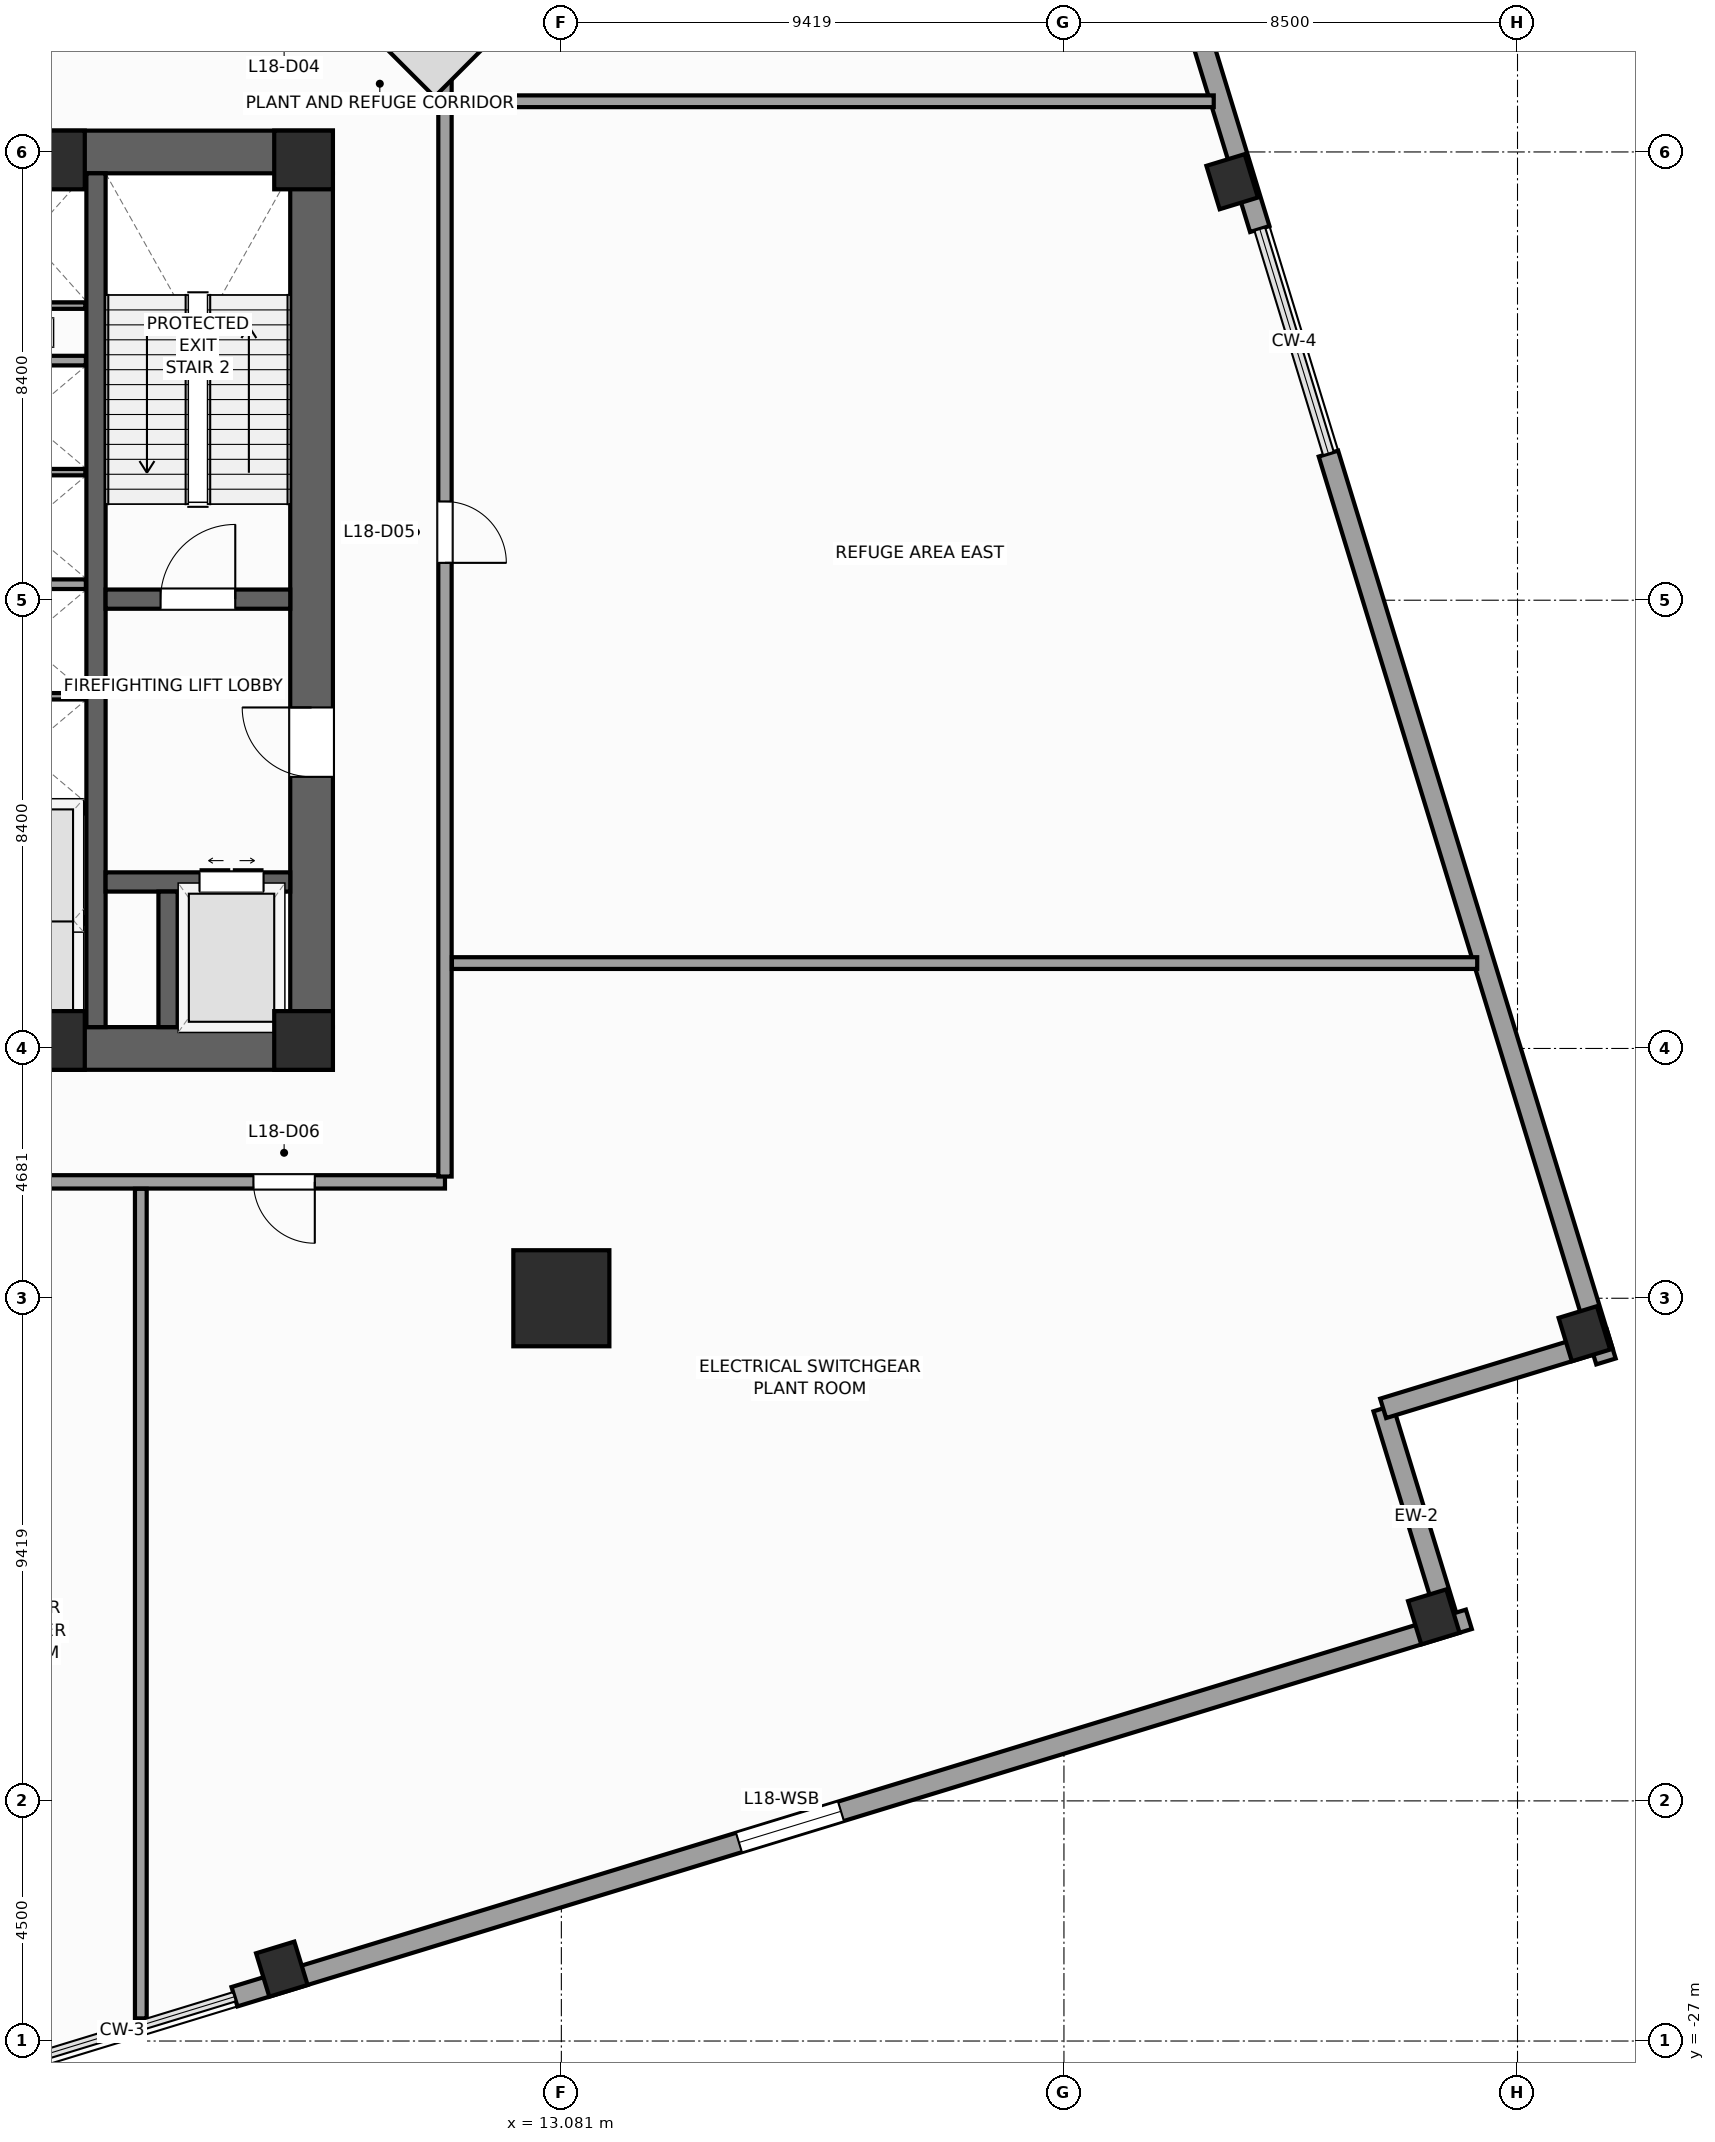
"""IFC4 building model, lengths in metres.
Left out: names, types, materials, properties, quantities, classifications, styles, units other than length and angle.
Written with IfcOpenShell. Run it as: python <this file> out.ifc"""

import sys

from ifc_helpers import new_model, si_unit, direction, frame, frame_2d, origin, origin_2d, place, context, subcontext, project, spatial, rectangle, extrude, source, transform, mapped, element, fill, save


model = new_model("IFC4")
c1 = context("Model", 3, precision=1e-05, world=origin(), true_north=direction((0.0, 1.0)))
c2 = subcontext(c1, "Body", "Model", "MODEL_VIEW")
j1 = project(units=[si_unit("LENGTHUNIT", "METRE"), si_unit("PLANEANGLEUNIT", "RADIAN")], contexts=[c1])
p1 = place(None, origin())
s1 = spatial("IfcSite", under=j1, at=p1, CompositionType="ELEMENT")
p2 = place(p1, origin())
s2 = spatial("IfcBuilding", under=s1, at=p2, CompositionType="ELEMENT")
p3 = place(p2, frame((0.0, 0.0, 78.0)))
s3 = spatial("IfcBuildingStorey", under=s2, at=p3, CompositionType="ELEMENT", Elevation=78.0)
p4 = place(p3, frame((-8.8, -8.4, 0.0), z_axis=(0.0, 0.0, 1.0), x_axis=(1.0, 0.0, 0.0)))
e1 = element("IfcWall", 1, at=p4, inside=s3, PredefinedType="SHEAR", context=c2, shape_type="SweptSolid", body=[
    extrude(rectangle(XDim=17.6, YDim=0.8, at=frame_2d((8.8, 0.0))), origin(), (0.0, 0.0, 1.0), 5.2),
])
p5 = place(p4, frame((8.15, 0.0, 0.0)))
e2 = element("IfcOpeningElement", 2, at=p5, cuts=e1, PredefinedType="OPENING", context=c2, shape_type="SweptSolid", body=[
    extrude(rectangle(XDim=1.3, YDim=2.2, at=frame_2d((0.65, 1.1))), frame((0.0, 0.41, 0.0), z_axis=(0.0, -1.0, 0.0), x_axis=(1.0, 0.0, 0.0)), (0.0, 0.0, 1.0), 0.82),
])
p6 = place(p3, frame((-8.8, 8.4, 0.0), z_axis=(0.0, 0.0, 1.0), x_axis=(1.0, 0.0, 0.0)))
e3 = element("IfcWall", 3, at=p6, inside=s3, PredefinedType="SHEAR", context=c2, shape_type="SweptSolid", body=[
    extrude(rectangle(XDim=17.6, YDim=0.8, at=frame_2d((8.8, 0.0))), origin(), (0.0, 0.0, 1.0), 5.2),
])
p7 = place(p3, frame((8.4, -8.0, 0.0), z_axis=(0.0, 0.0, 1.0), x_axis=(0.0, 1.0, 0.0)))
e4 = element("IfcWall", 4, at=p7, inside=s3, PredefinedType="SHEAR", context=c2, shape_type="SweptSolid", body=[
    extrude(rectangle(XDim=16.0, YDim=0.8, at=frame_2d((8.0, 0.0))), origin(), (0.0, 0.0, 1.0), 5.2),
])
p8 = place(p7, frame((4.69, 0.0, 0.0)))
e5 = element("IfcOpeningElement", 5, at=p8, cuts=e4, PredefinedType="OPENING", context=c2, shape_type="SweptSolid", body=[
    extrude(rectangle(XDim=1.3, YDim=2.2, at=frame_2d((0.65, 1.1))), frame((0.0, 0.41, 0.0), z_axis=(0.0, -1.0, 0.0), x_axis=(1.0, 0.0, 0.0)), (0.0, 0.0, 1.0), 0.82),
])
p9 = place(p3, frame((4.36, -8.0, 0.0), z_axis=(0.0, 0.0, 1.0), x_axis=(0.0, 1.0, 0.0)))
e6 = element("IfcWall", 6, at=p9, inside=s3, PredefinedType="SHEAR", context=c2, shape_type="SweptSolid", body=[
    extrude(rectangle(XDim=16.0, YDim=0.36, at=frame_2d((8.0, 0.0))), origin(), (0.0, 0.0, 1.0), 5.2),
])
p10 = place(p3, frame((4.54, 0.02, 0.0), z_axis=(0.0, 0.0, 1.0), x_axis=(1.0, 0.0, 0.0)))
e7 = element("IfcWall", 7, at=p10, inside=s3, PredefinedType="SHEAR", context=c2, shape_type="SweptSolid", body=[
    extrude(rectangle(XDim=3.46, YDim=0.36, at=frame_2d((1.73, 0.0))), origin(), (0.0, 0.0, 1.0), 5.2),
])
p11 = place(p10, frame((1.03, 0.0, 0.0)))
e8 = element("IfcOpeningElement", 8, at=p11, cuts=e7, PredefinedType="OPENING", context=c2, shape_type="SweptSolid", body=[
    extrude(rectangle(XDim=1.4, YDim=2.2, at=frame_2d((0.7, 1.1))), frame((0.0, 0.19, 0.0), z_axis=(0.0, -1.0, 0.0), x_axis=(1.0, 0.0, 0.0)), (0.0, 0.0, 1.0), 0.38),
])
p12 = place(p3, frame((4.54, -5.28, 0.0), z_axis=(0.0, 0.0, 1.0), x_axis=(1.0, 0.0, 0.0)))
e9 = element("IfcWall", 9, at=p12, inside=s3, PredefinedType="SHEAR", context=c2, shape_type="SweptSolid", body=[
    extrude(rectangle(XDim=3.46, YDim=0.36, at=frame_2d((1.73, 0.0))), origin(), (0.0, 0.0, 1.0), 5.2),
])
p13 = place(p12, frame((1.76, 0.0, 0.0)))
e10 = element("IfcOpeningElement", 10, at=p13, cuts=e9, PredefinedType="OPENING", context=c2, shape_type="SweptSolid", body=[
    extrude(rectangle(XDim=1.2, YDim=2.25, at=frame_2d((0.6, 1.125))), frame((0.0, 0.19, 0.0), z_axis=(0.0, -1.0, 0.0), x_axis=(1.0, 0.0, 0.0)), (0.0, 0.0, 1.0), 0.38),
])
p14 = place(p3, frame((5.71, -8.0, 0.0), z_axis=(0.0, 0.0, 1.0), x_axis=(0.0, 1.0, 0.0)))
e11 = element("IfcWall", 11, at=p14, inside=s3, PredefinedType="SHEAR", context=c2, shape_type="SweptSolid", body=[
    extrude(rectangle(XDim=2.54, YDim=0.36, at=frame_2d((1.27, 0.0))), origin(), (0.0, 0.0, 1.0), 5.2),
])
m1 = source(origin(), c2, "Body", "SweptSolid", [
    extrude(rectangle(XDim=1.1, YDim=1.1, at=origin_2d()), origin(), (0.0, 0.0, 1.0), 5.2),
])
for number, where, z_axis, x_axis in (
    (12, (8.25, -8.25, 0.0), (0.0, 0.0, 1.0), (1.0, 0.0, 0.0)),
    (13, (8.25, 8.25, 0.0), (0.0, 0.0, 1.0), (1.0, 0.0, 0.0)),
    (14, (3.6, -8.25, 0.0), (0.0, 0.0, 1.0), (1.0, 0.0, 0.0)),
    (15, (3.6, 8.25, 0.0), (0.0, 0.0, 1.0), (1.0, 0.0, 0.0)),
):
    element("IfcColumn", number, at=place(p3, frame(where, z_axis=z_axis, x_axis=x_axis)), inside=s3, PredefinedType="PILASTER", context=c2, shape_type="MappedRepresentation", body=[
        mapped(m1, transform((0.0, 0.0, 0.0), scale=1.0)),
    ])
m2 = source(origin(), c2, "Body", "SweptSolid", [
    extrude(rectangle(XDim=1.8, YDim=1.8, at=origin_2d()), origin(), (0.0, 0.0, 1.0), 5.2),
])
p15 = place(p3, frame((13.081, -13.081, 0.0), z_axis=(0.0, 0.0, 1.0), x_axis=(1.0, 0.0, 0.0)))
e16 = element("IfcColumn", 16, at=p15, inside=s3, PredefinedType="COLUMN", context=c2, shape_type="MappedRepresentation", body=[
    mapped(m2, transform((0.0, 0.0, 0.0), scale=1.0)),
])
m3 = source(origin(), c2, "Body", "SweptSolid", [
    extrude(rectangle(XDim=0.75, YDim=0.85, at=origin_2d()), origin(), (0.0, 0.0, 1.0), 5.2),
])
for number, where, z_axis, x_axis in (
    (17, (7.843, -25.653, 0.0), (0.0, 0.0, 1.0), (0.956, 0.292, 0.0)),
    (18, (29.431, -19.052, 0.0), (0.0, 0.0, 1.0), (0.956, 0.292, 0.0)),
    (19, (32.253, -13.746, 0.0), (0.0, 0.0, 1.0), (0.956, 0.292, 0.0)),
    (20, (25.653, 7.843, 0.0), (0.0, 0.0, 1.0), (0.956, 0.292, 0.0)),
):
    element("IfcColumn", number, at=place(p3, frame(where, z_axis=z_axis, x_axis=x_axis)), inside=s3, PredefinedType="COLUMN", context=c2, shape_type="MappedRepresentation", body=[
        mapped(m3, transform((0.0, 0.0, 0.0), scale=1.0)),
    ])
p16 = place(p3, frame((29.725, -19.208, 0.0), z_axis=(0.0, 0.0, 1.0), x_axis=(-0.292345507338, 0.956312764915, 0.0)))
e21 = element("IfcWall", 21, at=p16, inside=s3, PredefinedType="STANDARD", context=c2, shape_type="SweptSolid", body=[
    extrude(rectangle(XDim=4.25, YDim=0.38, at=frame_2d((2.125, 0.0))), origin(), (0.0, 0.0, 1.0), 4.94),
])
p17 = place(p3, frame((28.482, -15.144, 0.0), z_axis=(0.0, 0.0, 1.0), x_axis=(0.956304176051, 0.292373601522, 0.0)))
e22 = element("IfcWall", 22, at=p17, inside=s3, PredefinedType="STANDARD", context=c2, shape_type="SweptSolid", body=[
    extrude(rectangle(XDim=4.44, YDim=0.38, at=frame_2d((2.22, 0.0))), origin(), (0.0, 0.0, 1.0), 4.24),
])
p18 = place(p3, frame((6.955, -26.17, 0.0), z_axis=(0.0, 0.0, 1.0), x_axis=(0.95630447169, 0.292372634538, 0.0)))
e23 = element("IfcWall", 23, at=p18, inside=s3, PredefinedType="STANDARD", context=c2, shape_type="SweptSolid", body=[
    extrude(rectangle(XDim=24.19, YDim=0.38, at=frame_2d((12.095, 0.0))), origin(), (0.0, 0.0, 1.0), 4.34),
])
p19 = place(p18, frame((9.885, 0.0, 0.65)))
e24 = element("IfcOpeningElement", 24, at=p19, cuts=e23, PredefinedType="OPENING", context=c2, shape_type="SweptSolid", body=[
    extrude(rectangle(XDim=2.0, YDim=1.45, at=frame_2d((1.0, 0.725))), frame((0.0, 0.2, 0.0), z_axis=(0.0, -1.0, 0.0), x_axis=(1.0, 0.0, 0.0)), (0.0, 0.0, 1.0), 0.4),
])
p20 = place(p3, frame((32.658, -14.265, 0.0), z_axis=(0.0, 0.0, 1.0), x_axis=(-0.292377517944, 0.956302978664, 0.0)))
e25 = element("IfcWall", 25, at=p20, inside=s3, PredefinedType="STANDARD", context=c2, shape_type="SweptSolid", body=[
    extrude(rectangle(XDim=17.79, YDim=0.38, at=frame_2d((8.895, 0.0))), origin(), (0.0, 0.0, 1.0), 4.34),
])
p21 = place(p3, frame((26.17, 6.955, 0.0), z_axis=(0.0, 0.0, 1.0), x_axis=(-0.292372634538, 0.95630447169, 0.0)))
e26 = element("IfcWall", 26, at=p21, inside=s3, PredefinedType="STANDARD", context=c2, shape_type="SweptSolid", body=[
    extrude(rectangle(XDim=24.19, YDim=0.38, at=frame_2d((12.095, 0.0))), origin(), (0.0, 0.0, 1.0), 4.34),
])
p22 = place(p21, frame((9.885, 0.0, 0.65)))
e27 = element("IfcOpeningElement", 27, at=p22, cuts=e26, PredefinedType="OPENING", context=c2, shape_type="SweptSolid", body=[
    extrude(rectangle(XDim=2.0, YDim=1.45, at=frame_2d((1.0, 0.725))), frame((0.0, 0.2, 0.0), z_axis=(0.0, -1.0, 0.0), x_axis=(1.0, 0.0, 0.0)), (0.0, 0.0, 1.0), 0.4),
])
for number, where, z_axis, x_axis in (
    (28, (1.89, -3.9, 0.0), (0.0, 0.0, 1.0), (1.0, 0.0, 0.0)),
    (29, (1.89, 0.3, 0.0), (0.0, 0.0, 1.0), (1.0, 0.0, 0.0)),
    (30, (1.89, 4.49, 0.0), (0.0, 0.0, 1.0), (1.0, 0.0, 0.0)),
):
    element("IfcWall", number, at=place(p3, frame(where, z_axis=z_axis, x_axis=x_axis)), inside=s3, PredefinedType="PARTITIONING", context=c2, shape_type="SweptSolid", body=[
        extrude(rectangle(XDim=2.28, YDim=0.18, at=frame_2d((1.14, 0.0))), origin(), (0.0, 0.0, 1.0), 4.94),
    ])
for number, where, z_axis, x_axis in (
    (31, (1.9, -6.0, 0.0), (0.0, 0.0, 1.0), (1.0, 0.0, 0.0)),
    (32, (1.9, -1.8, 0.0), (0.0, 0.0, 1.0), (1.0, 0.0, 0.0)),
    (33, (1.9, 2.4, 0.0), (0.0, 0.0, 1.0), (1.0, 0.0, 0.0)),
):
    element("IfcWall", number, at=place(p3, frame(where, z_axis=z_axis, x_axis=x_axis)), inside=s3, PredefinedType="PARTITIONING", context=c2, shape_type="SweptSolid", body=[
        extrude(rectangle(XDim=2.26, YDim=0.12, at=frame_2d((1.13, 0.0))), origin(), (0.0, 0.0, 1.0), 4.94),
    ])
p23 = place(p3, frame((2.06, 5.52, 0.0), z_axis=(0.0, 0.0, 1.0), x_axis=(1.0, 0.0, 0.0)))
e34 = element("IfcWall", 34, at=p23, inside=s3, PredefinedType="PARTITIONING", context=c2, shape_type="SweptSolid", body=[
    extrude(rectangle(XDim=2.1, YDim=0.12, at=frame_2d((1.05, 0.0))), origin(), (0.0, 0.0, 1.0), 4.94),
])
p24 = place(p3, frame((-10.9, -10.9, 0.0), z_axis=(0.0, 0.0, 1.0), x_axis=(1.0, 0.0, 0.0)))
e35 = element("IfcWall", 35, at=p24, inside=s3, PredefinedType="PARTITIONING", context=c2, shape_type="SweptSolid", body=[
    extrude(rectangle(XDim=21.8, YDim=0.25, at=frame_2d((10.9, 0.0))), origin(), (0.0, 0.0, 1.0), 4.94),
])
p25 = place(p24, frame((18.21, 0.0, 0.0)))
e36 = element("IfcOpeningElement", 36, at=p25, cuts=e35, PredefinedType="OPENING", context=c2, shape_type="SweptSolid", body=[
    extrude(rectangle(XDim=1.15, YDim=2.25, at=frame_2d((0.575, 1.125))), frame((0.0, 0.135, 0.0), z_axis=(0.0, -1.0, 0.0), x_axis=(1.0, 0.0, 0.0)), (0.0, 0.0, 1.0), 0.27),
])
p26 = place(p24, frame((12.925, 0.0, 0.0)))
e37 = element("IfcOpeningElement", 37, at=p26, cuts=e35, PredefinedType="OPENING", context=c2, shape_type="SweptSolid", body=[
    extrude(rectangle(XDim=1.15, YDim=2.25, at=frame_2d((0.575, 1.125))), frame((0.0, 0.135, 0.0), z_axis=(0.0, -1.0, 0.0), x_axis=(1.0, 0.0, 0.0)), (0.0, 0.0, 1.0), 0.27),
])
p27 = place(p24, frame((7.725, 0.0, 0.0)))
e38 = element("IfcOpeningElement", 38, at=p27, cuts=e35, PredefinedType="OPENING", context=c2, shape_type="SweptSolid", body=[
    extrude(rectangle(XDim=1.15, YDim=2.25, at=frame_2d((0.575, 1.125))), frame((0.0, 0.135, 0.0), z_axis=(0.0, -1.0, 0.0), x_axis=(1.0, 0.0, 0.0)), (0.0, 0.0, 1.0), 0.27),
])
p28 = place(p24, frame((2.439, 0.0, 0.0)))
e39 = element("IfcOpeningElement", 39, at=p28, cuts=e35, PredefinedType="OPENING", context=c2, shape_type="SweptSolid", body=[
    extrude(rectangle(XDim=1.15, YDim=2.25, at=frame_2d((0.575, 1.125))), frame((0.0, 0.135, 0.0), z_axis=(0.0, -1.0, 0.0), x_axis=(1.0, 0.0, 0.0)), (0.0, 0.0, 1.0), 0.27),
])
p29 = place(p3, frame((10.9, -10.8, 0.0), z_axis=(0.0, 0.0, 1.0), x_axis=(0.0, 1.0, 0.0)))
e40 = element("IfcWall", 40, at=p29, inside=s3, PredefinedType="PARTITIONING", context=c2, shape_type="SweptSolid", body=[
    extrude(rectangle(XDim=21.6, YDim=0.25, at=frame_2d((10.8, 0.0))), origin(), (0.0, 0.0, 1.0), 4.94),
])
p30 = place(p29, frame((11.5, 0.0, 0.0)))
e41 = element("IfcOpeningElement", 41, at=p30, cuts=e40, PredefinedType="OPENING", context=c2, shape_type="SweptSolid", body=[
    extrude(rectangle(XDim=1.15, YDim=2.25, at=frame_2d((0.575, 1.125))), frame((0.0, 0.135, 0.0), z_axis=(0.0, -1.0, 0.0), x_axis=(1.0, 0.0, 0.0)), (0.0, 0.0, 1.0), 0.27),
])
p31 = place(p3, frame((11.03, 9.35, 0.0), z_axis=(0.0, 0.0, 1.0), x_axis=(1.0, 0.0, 0.0)))
e42 = element("IfcWall", 42, at=p31, inside=s3, PredefinedType="PARTITIONING", context=c2, shape_type="SweptSolid", body=[
    extrude(rectangle(XDim=14.277, YDim=0.22, at=frame_2d((7.139, 0.0))), origin(), (0.0, 0.0, 1.0), 4.24),
])
p32 = place(p3, frame((11.03, -6.8, 0.0), z_axis=(0.0, 0.0, 1.0), x_axis=(1.0, 0.0, 0.0)))
e43 = element("IfcWall", 43, at=p32, inside=s3, PredefinedType="PARTITIONING", context=c2, shape_type="SweptSolid", body=[
    extrude(rectangle(XDim=19.215, YDim=0.22, at=frame_2d((9.607, 0.0))), origin(), (0.0, 0.0, 1.0), 4.94),
])
p33 = place(p3, frame((5.2, -11.03, 0.0), z_axis=(0.0, 0.0, 1.0), x_axis=(0.0, -1.0, 0.0)))
e44 = element("IfcWall", 44, at=p33, inside=s3, PredefinedType="PARTITIONING", context=c2, shape_type="SweptSolid", body=[
    extrude(rectangle(XDim=15.546, YDim=0.22, at=frame_2d((7.773, 0.0))), origin(), (0.0, 0.0, 1.0), 4.94),
])
m4 = source(origin(), c2, "Body", "SweptSolid", [
    extrude(rectangle(XDim=2.0, YDim=1.45, at=frame_2d((1.0, 0.725))), frame((0.0, 0.03, 0.0), z_axis=(0.0, -1.0, 0.0), x_axis=(1.0, 0.0, 0.0)), (0.0, 0.0, 1.0), 0.06),
])
p34 = place(p19, origin())
e45 = element("IfcWindow", 45, at=p34, inside=s3, PartitioningType="SINGLE_PANEL", PredefinedType="WINDOW", context=c2, shape_type="MappedRepresentation", body=[
    mapped(m4, transform((0.0, 0.0, 0.0), scale=1.0)),
])
fill(e24, e45)
m5 = source(origin(), c2, "Body", "SweptSolid", [
    extrude(rectangle(XDim=1.4, YDim=2.2, at=frame_2d((0.7, 1.1))), frame((0.0, 0.025, 0.0), z_axis=(0.0, -1.0, 0.0), x_axis=(1.0, 0.0, 0.0)), (0.0, 0.0, 1.0), 0.05),
])
p35 = place(p11, origin())
e46 = element("IfcDoor", 46, at=p35, inside=s3, OperationType="SINGLE_SWING_RIGHT", PredefinedType="DOOR", context=c2, shape_type="MappedRepresentation", body=[
    mapped(m5, transform((0.0, 0.0, 0.0), scale=1.0)),
])
fill(e8, e46)
m6 = source(origin(), c2, "Body", "SweptSolid", [
    extrude(rectangle(XDim=1.3, YDim=2.2, at=frame_2d((0.65, 1.1))), frame((0.0, 0.025, 0.0), z_axis=(0.0, -1.0, 0.0), x_axis=(1.0, 0.0, 0.0)), (0.0, 0.0, 1.0), 0.05),
])
p36 = place(p8, origin())
e47 = element("IfcDoor", 47, at=p36, inside=s3, OperationType="SINGLE_SWING_RIGHT", PredefinedType="DOOR", context=c2, shape_type="MappedRepresentation", body=[
    mapped(m6, transform((0.0, 0.0, 0.0), scale=1.0)),
])
fill(e5, e47)
m7 = source(origin(), c2, "Body", "SweptSolid", [
    extrude(rectangle(XDim=1.2, YDim=2.25, at=frame_2d((0.6, 1.125))), frame((0.0, 0.025, 0.0), z_axis=(0.0, -1.0, 0.0), x_axis=(1.0, 0.0, 0.0)), (0.0, 0.0, 1.0), 0.05),
])
p37 = place(p13, origin())
e48 = element("IfcDoor", 48, at=p37, inside=s3, OperationType="DOUBLE_DOOR_SLIDING", PredefinedType="DOOR", context=c2, shape_type="MappedRepresentation", body=[
    mapped(m7, transform((0.0, 0.0, 0.0), scale=1.0)),
])
fill(e10, e48)
m8 = source(origin(), c2, "Body", "SweptSolid", [
    extrude(rectangle(XDim=1.15, YDim=2.25, at=frame_2d((0.575, 1.125))), frame((0.0, 0.025, 0.0), z_axis=(0.0, -1.0, 0.0), x_axis=(1.0, 0.0, 0.0)), (0.0, 0.0, 1.0), 0.05),
])
p38 = place(p30, frame((1.15, 0.0, 0.0), z_axis=(0.0, 0.0, 1.0), x_axis=(-1.0, 0.0, 0.0)))
e49 = element("IfcDoor", 49, at=p38, inside=s3, OperationType="SINGLE_SWING_LEFT", PredefinedType="DOOR", context=c2, shape_type="MappedRepresentation", body=[
    mapped(m8, transform((0.0, 0.0, 0.0), scale=1.0)),
])
fill(e41, e49)
p39 = place(p25, frame((1.15, 0.0, 0.0), z_axis=(0.0, 0.0, 1.0), x_axis=(-1.0, 0.0, 0.0)))
e50 = element("IfcDoor", 50, at=p39, inside=s3, OperationType="SINGLE_SWING_RIGHT", PredefinedType="DOOR", context=c2, shape_type="MappedRepresentation", body=[
    mapped(m8, transform((0.0, 0.0, 0.0), scale=1.0)),
])
fill(e36, e50)
save(model, sys.argv[1])
